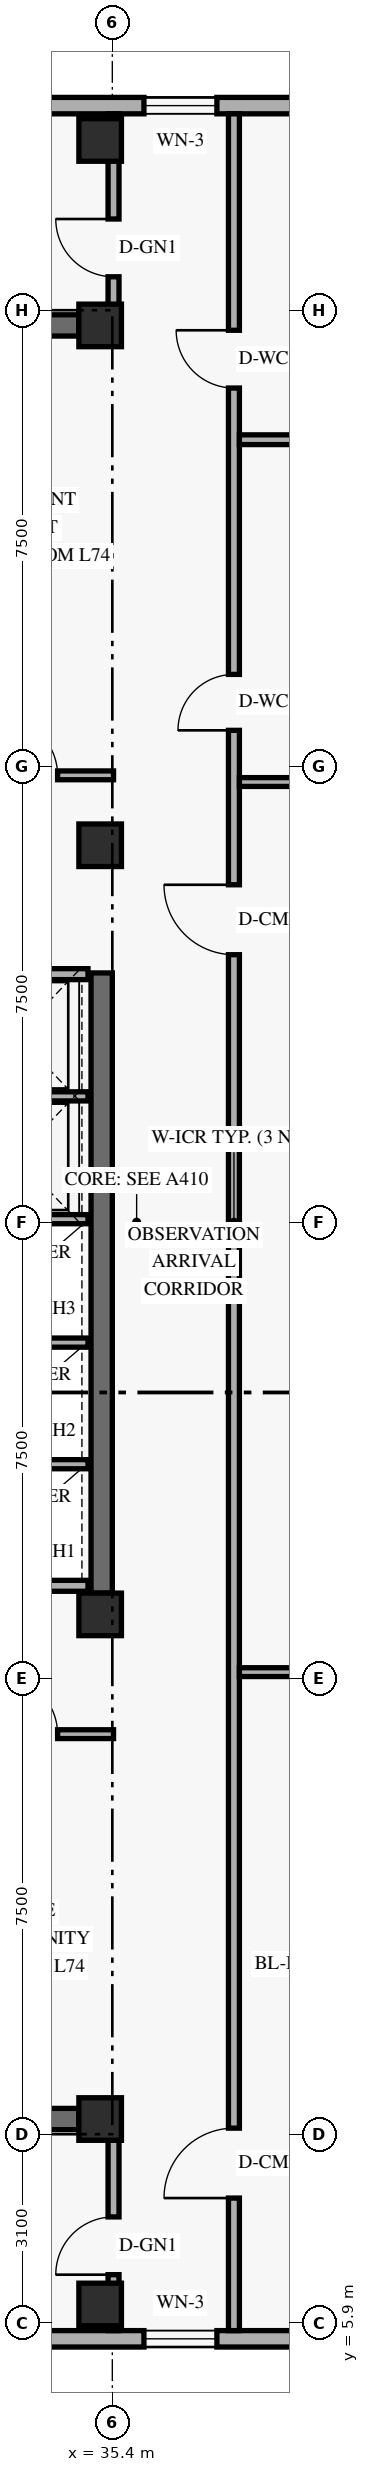
"""IFC4 building model, lengths in metres.
Left out: names, types, materials, properties, quantities, classifications, styles, units other than length and angle.
Written with IfcOpenShell. Run it as: python <this file> out.ifc"""

import sys

from ifc_helpers import new_model, si_unit, direction, frame, frame_2d, origin, origin_2d, place, context, subcontext, project, spatial, rectangle, extrude, element, fill, save


model = new_model("IFC4")
c1 = context("Model", 3, precision=1e-05, world=origin(), true_north=direction((0.0, 1.0)))
c2 = subcontext(c1, "Body", "Model", "MODEL_VIEW")
j1 = project(units=[si_unit("LENGTHUNIT", "METRE"), si_unit("PLANEANGLEUNIT", "RADIAN")], contexts=[c1])
p1 = place(None, origin())
s1 = spatial("IfcSite", under=j1, at=p1, CompositionType="ELEMENT")
p2 = place(p1, origin())
s2 = spatial("IfcBuilding", under=s1, at=p2, CompositionType="ELEMENT")
p3 = place(p2, frame((0.0, 0.0, 282.0)))
s3 = spatial("IfcBuildingStorey", under=s2, at=p3, CompositionType="ELEMENT", Elevation=282.0)
p4 = place(p3, frame((35.225, 17.9, 0.0), z_axis=(0.0, 0.0, 1.0), x_axis=(0.0, 1.0, 0.0)))
e1 = element("IfcWall", 1, at=p4, inside=s3, PredefinedType="SHEAR", context=c2, shape_type="SweptSolid", body=[
    extrude(rectangle(XDim=10.2, YDim=0.35, at=frame_2d((5.1, 0.0))), origin(), (0.0, 0.0, 1.0), 4.161),
])
for number, where, z_axis, x_axis in (
    (2, (24.55, 9.25, 0.0), (0.0, 0.0, 1.0), (1.0, 0.0, 0.0)),
    (3, (24.55, 38.75, 0.0), (0.0, 0.0, 1.0), (1.0, 0.0, 0.0)),
):
    element("IfcWall", number, at=place(p3, frame(where, z_axis=z_axis, x_axis=x_axis)), inside=s3, PredefinedType="SHEAR", context=c2, shape_type="SweptSolid", body=[
        extrude(rectangle(XDim=10.3, YDim=0.35, at=frame_2d((5.15, 0.0))), origin(), (0.0, 0.0, 1.0), 4.7),
    ])
for number, where, z_axis, x_axis in (
    (4, (35.2, 6.2, 0.0), (0.0, 0.0, 1.0), (1.0, 0.0, 0.0)),
    (5, (35.2, 9.25, 0.0), (0.0, 0.0, 1.0), (1.0, 0.0, 0.0)),
    (6, (35.2, 17.55, 0.0), (0.0, 0.0, 1.0), (1.0, 0.0, 0.0)),
    (7, (35.2, 30.2, 0.0), (0.0, 0.0, 1.0), (1.0, 0.0, 0.0)),
    (8, (35.2, 38.75, 0.0), (0.0, 0.0, 1.0), (1.0, 0.0, 0.0)),
    (9, (35.2, 41.8, 0.0), (0.0, 0.0, 1.0), (1.0, 0.0, 0.0)),
):
    element("IfcColumn", number, at=place(p3, frame(where, z_axis=z_axis, x_axis=x_axis)), inside=s3, PredefinedType="COLUMN", context=c2, shape_type="SweptSolid", body=[
        extrude(rectangle(XDim=0.7, YDim=0.7, at=origin_2d()), origin(), (0.0, 0.0, 1.0), 5.0),
    ])
p5 = place(p3, frame((25.82, 5.635, 0.0), z_axis=(0.0, 0.0, 1.0), x_axis=(1.0, 0.0, 0.0)))
e10 = element("IfcWall", 10, at=p5, inside=s3, PredefinedType="SOLIDWALL", context=c2, shape_type="SweptSolid", body=[
    extrude(rectangle(XDim=32.96, YDim=0.27, at=frame_2d((16.48, 0.0))), origin(), (0.0, 0.0, 1.0), 4.7),
])
p6 = place(p5, frame((3.27, 0.0, 0.85)))
e11 = element("IfcOpeningElement", 11, at=p6, cuts=e10, PredefinedType="OPENING", context=c2, shape_type="SweptSolid", body=[
    extrude(rectangle(XDim=2.4, YDim=1.9, at=frame_2d((1.2, 0.95))), frame((0.0, 0.145, 0.0), z_axis=(0.0, -1.0, 0.0), x_axis=(1.0, 0.0, 0.0)), (0.0, 0.0, 1.0), 0.29),
])
p7 = place(p5, frame((10.1, 0.0, 0.85)))
e12 = element("IfcOpeningElement", 12, at=p7, cuts=e10, PredefinedType="OPENING", context=c2, shape_type="SweptSolid", body=[
    extrude(rectangle(XDim=1.2, YDim=1.5, at=frame_2d((0.6, 0.75))), frame((0.0, 0.145, 0.0), z_axis=(0.0, -1.0, 0.0), x_axis=(1.0, 0.0, 0.0)), (0.0, 0.0, 1.0), 0.29),
])
p8 = place(p5, frame((16.407, 0.0, 0.85)))
e13 = element("IfcOpeningElement", 13, at=p8, cuts=e10, PredefinedType="OPENING", context=c2, shape_type="SweptSolid", body=[
    extrude(rectangle(XDim=2.4, YDim=1.9, at=frame_2d((1.2, 0.95))), frame((0.0, 0.145, 0.0), z_axis=(0.0, -1.0, 0.0), x_axis=(1.0, 0.0, 0.0)), (0.0, 0.0, 1.0), 0.29),
])
p9 = place(p3, frame((58.78, 42.365, 0.0), z_axis=(0.0, 0.0, 1.0), x_axis=(-1.0, 0.0, 0.0)))
e14 = element("IfcWall", 14, at=p9, inside=s3, PredefinedType="SOLIDWALL", context=c2, shape_type="SweptSolid", body=[
    extrude(rectangle(XDim=32.96, YDim=0.27, at=frame_2d((16.48, 0.0))), origin(), (0.0, 0.0, 1.0), 4.7),
])
p10 = place(p9, frame((27.29, 0.0, 0.85)))
e15 = element("IfcOpeningElement", 15, at=p10, cuts=e14, PredefinedType="OPENING", context=c2, shape_type="SweptSolid", body=[
    extrude(rectangle(XDim=2.4, YDim=1.9, at=frame_2d((1.2, 0.95))), frame((0.0, 0.145, 0.0), z_axis=(0.0, -1.0, 0.0), x_axis=(1.0, 0.0, 0.0)), (0.0, 0.0, 1.0), 0.29),
])
p11 = place(p9, frame((21.66, 0.0, 0.85)))
e16 = element("IfcOpeningElement", 16, at=p11, cuts=e14, PredefinedType="OPENING", context=c2, shape_type="SweptSolid", body=[
    extrude(rectangle(XDim=1.2, YDim=1.5, at=frame_2d((0.6, 0.75))), frame((0.0, 0.145, 0.0), z_axis=(0.0, -1.0, 0.0), x_axis=(1.0, 0.0, 0.0)), (0.0, 0.0, 1.0), 0.29),
])
p12 = place(p9, frame((17.13, 0.0, 0.85)))
e17 = element("IfcOpeningElement", 17, at=p12, cuts=e14, PredefinedType="OPENING", context=c2, shape_type="SweptSolid", body=[
    extrude(rectangle(XDim=2.4, YDim=1.9, at=frame_2d((1.2, 0.95))), frame((0.0, 0.145, 0.0), z_axis=(0.0, -1.0, 0.0), x_axis=(1.0, 0.0, 0.0)), (0.0, 0.0, 1.0), 0.29),
])
p13 = place(p9, frame((3.054, 0.0, 0.85)))
e18 = element("IfcOpeningElement", 18, at=p13, cuts=e14, PredefinedType="OPENING", context=c2, shape_type="SweptSolid", body=[
    extrude(rectangle(XDim=2.4, YDim=1.9, at=frame_2d((1.2, 0.95))), frame((0.0, 0.145, 0.0), z_axis=(0.0, -1.0, 0.0), x_axis=(1.0, 0.0, 0.0)), (0.0, 0.0, 1.0), 0.29),
])
for number, where, z_axis, x_axis in (
    (19, (32.74, 18.02, 0.0), (0.0, 0.0, 1.0), (1.0, 0.0, 0.0)),
    (20, (32.74, 28.08, 0.0), (0.0, 0.0, 1.0), (1.0, 0.0, 0.0)),
):
    element("IfcWall", number, at=place(p3, frame(where, z_axis=z_axis, x_axis=x_axis)), inside=s3, PredefinedType="STANDARD", context=c2, shape_type="SweptSolid", body=[
        extrude(rectangle(XDim=2.26, YDim=0.18, at=frame_2d((1.13, 0.0))), origin(), (0.0, 0.0, 1.0), 4.7),
    ])
for number, where, z_axis, x_axis in (
    (21, (32.74, 20.02, 0.0), (0.0, 0.0, 1.0), (1.0, 0.0, 0.0)),
    (22, (32.74, 22.02, 0.0), (0.0, 0.0, 1.0), (1.0, 0.0, 0.0)),
    (23, (32.74, 24.05, 0.0), (0.0, 0.0, 1.0), (1.0, 0.0, 0.0)),
    (24, (32.74, 26.07, 0.0), (0.0, 0.0, 1.0), (1.0, 0.0, 0.0)),
):
    element("IfcWall", number, at=place(p3, frame(where, z_axis=z_axis, x_axis=x_axis)), inside=s3, PredefinedType="STANDARD", context=c2, shape_type="SweptSolid", body=[
        extrude(rectangle(XDim=2.26, YDim=0.15, at=frame_2d((1.13, 0.0))), origin(), (0.0, 0.0, 1.0), 4.7),
    ])
p14 = place(p3, frame((37.4, 5.77, 0.0), z_axis=(0.0, 0.0, 1.0), x_axis=(0.0, 1.0, 0.0)))
e25 = element("IfcWall", 25, at=p14, inside=s3, PredefinedType="STANDARD", context=c2, shape_type="SweptSolid", body=[
    extrude(rectangle(XDim=36.46, YDim=0.18, at=frame_2d((18.23, 0.0))), origin(), (0.0, 0.0, 1.0), 4.143),
])
p15 = place(p14, frame((26.32, 0.0, 0.0)))
e26 = element("IfcOpeningElement", 26, at=p15, cuts=e25, PredefinedType="OPENING", context=c2, shape_type="SweptSolid", body=[
    extrude(rectangle(XDim=0.92, YDim=2.14, at=frame_2d((0.46, 1.07))), frame((0.0, 0.1, 0.0), z_axis=(0.0, -1.0, 0.0), x_axis=(1.0, 0.0, 0.0)), (0.0, 0.0, 1.0), 0.2),
])
p16 = place(p14, frame((31.95, 0.0, 0.0)))
e27 = element("IfcOpeningElement", 27, at=p16, cuts=e25, PredefinedType="OPENING", context=c2, shape_type="SweptSolid", body=[
    extrude(rectangle(XDim=0.95, YDim=2.14, at=frame_2d((0.475, 1.07))), frame((0.0, 0.1, 0.0), z_axis=(0.0, -1.0, 0.0), x_axis=(1.0, 0.0, 0.0)), (0.0, 0.0, 1.0), 0.2),
])
p17 = place(p14, frame((2.18, 0.0, 0.0)))
e28 = element("IfcOpeningElement", 28, at=p17, cuts=e25, PredefinedType="OPENING", context=c2, shape_type="SweptSolid", body=[
    extrude(rectangle(XDim=1.15, YDim=2.15, at=frame_2d((0.575, 1.075))), frame((0.0, 0.1, 0.0), z_axis=(0.0, -1.0, 0.0), x_axis=(1.0, 0.0, 0.0)), (0.0, 0.0, 1.0), 0.2),
])
p18 = place(p14, frame((22.63, 0.0, 0.0)))
e29 = element("IfcOpeningElement", 29, at=p18, cuts=e25, PredefinedType="OPENING", context=c2, shape_type="SweptSolid", body=[
    extrude(rectangle(XDim=1.15, YDim=2.15, at=frame_2d((0.575, 1.075))), frame((0.0, 0.1, 0.0), z_axis=(0.0, -1.0, 0.0), x_axis=(1.0, 0.0, 0.0)), (0.0, 0.0, 1.0), 0.2),
])
p19 = place(p3, frame((35.42, 5.77, 0.0), z_axis=(0.0, 0.0, 1.0), x_axis=(0.0, 1.0, 0.0)))
e30 = element("IfcWall", 30, at=p19, inside=s3, PredefinedType="STANDARD", context=c2, shape_type="SweptSolid", body=[
    extrude(rectangle(XDim=3.48, YDim=0.18, at=frame_2d((1.74, 0.0))), origin(), (0.0, 0.0, 1.0), 4.143),
])
p20 = place(p19, frame((0.92, 0.0, 0.0)))
e31 = element("IfcOpeningElement", 31, at=p20, cuts=e30, PredefinedType="OPENING", context=c2, shape_type="SweptSolid", body=[
    extrude(rectangle(XDim=0.95, YDim=2.15, at=frame_2d((0.475, 1.075))), frame((0.0, 0.1, 0.0), z_axis=(0.0, -1.0, 0.0), x_axis=(1.0, 0.0, 0.0)), (0.0, 0.0, 1.0), 0.2),
])
p21 = place(p3, frame((35.42, 38.75, 0.0), z_axis=(0.0, 0.0, 1.0), x_axis=(0.0, 1.0, 0.0)))
e32 = element("IfcWall", 32, at=p21, inside=s3, PredefinedType="STANDARD", context=c2, shape_type="SweptSolid", body=[
    extrude(rectangle(XDim=3.48, YDim=0.18, at=frame_2d((1.74, 0.0))), origin(), (0.0, 0.0, 1.0), 4.143),
])
p22 = place(p21, frame((0.8, 0.0, 0.0)))
e33 = element("IfcOpeningElement", 33, at=p22, cuts=e32, PredefinedType="OPENING", context=c2, shape_type="SweptSolid", body=[
    extrude(rectangle(XDim=0.95, YDim=2.15, at=frame_2d((0.475, 1.075))), frame((0.0, 0.1, 0.0), z_axis=(0.0, -1.0, 0.0), x_axis=(1.0, 0.0, 0.0)), (0.0, 0.0, 1.0), 0.2),
])
for number, where, z_axis, x_axis in (
    (34, (37.49, 16.6, 0.0), (0.0, 0.0, 1.0), (1.0, 0.0, 0.0)),
    (35, (37.49, 31.24, 0.0), (0.0, 0.0, 1.0), (1.0, 0.0, 0.0)),
):
    element("IfcWall", number, at=place(p3, frame(where, z_axis=z_axis, x_axis=x_axis)), inside=s3, PredefinedType="PARTITIONING", context=c2, shape_type="SweptSolid", body=[
        extrude(rectangle(XDim=22.04, YDim=0.145, at=frame_2d((11.02, 0.0))), origin(), (0.0, 0.0, 1.0), 4.143),
    ])
p23 = place(p3, frame((37.49, 36.87, 0.0), z_axis=(0.0, 0.0, 1.0), x_axis=(1.0, 0.0, 0.0)))
e36 = element("IfcWall", 36, at=p23, inside=s3, PredefinedType="PLUMBINGWALL", context=c2, shape_type="SweptSolid", body=[
    extrude(rectangle(XDim=5.93, YDim=0.16, at=frame_2d((2.965, 0.0))), origin(), (0.0, 0.0, 1.0), 4.7),
])
p24 = place(p3, frame((32.722, 15.58, 0.0), z_axis=(0.0, 0.0, 1.0), x_axis=(1.0, 0.0, 0.0)))
e37 = element("IfcWall", 37, at=p24, inside=s3, PredefinedType="PARTITIONING", context=c2, shape_type="SweptSolid", body=[
    extrude(rectangle(XDim=2.698, YDim=0.145, at=frame_2d((1.349, 0.0))), origin(), (0.0, 0.0, 1.0), 4.143),
])
p25 = place(p24, frame((0.827, 0.0, 0.0)))
e38 = element("IfcOpeningElement", 38, at=p25, cuts=e37, PredefinedType="OPENING", context=c2, shape_type="SweptSolid", body=[
    extrude(rectangle(XDim=0.95, YDim=2.15, at=frame_2d((0.475, 1.075))), frame((0.0, 0.083, 0.0), z_axis=(0.0, -1.0, 0.0), x_axis=(1.0, 0.0, 0.0)), (0.0, 0.0, 1.0), 0.165),
])
p26 = place(p3, frame((32.722, 31.35, 0.0), z_axis=(0.0, 0.0, 1.0), x_axis=(1.0, 0.0, 0.0)))
e39 = element("IfcWall", 39, at=p26, inside=s3, PredefinedType="PARTITIONING", context=c2, shape_type="SweptSolid", body=[
    extrude(rectangle(XDim=2.698, YDim=0.145, at=frame_2d((1.349, 0.0))), origin(), (0.0, 0.0, 1.0), 4.143),
])
p27 = place(p26, frame((0.827, 0.0, 0.0)))
e40 = element("IfcOpeningElement", 40, at=p27, cuts=e39, PredefinedType="OPENING", context=c2, shape_type="SweptSolid", body=[
    extrude(rectangle(XDim=0.95, YDim=2.15, at=frame_2d((0.475, 1.075))), frame((0.0, 0.083, 0.0), z_axis=(0.0, -1.0, 0.0), x_axis=(1.0, 0.0, 0.0)), (0.0, 0.0, 1.0), 0.165),
])
p28 = place(p7, origin())
e41 = element("IfcWindow", 41, at=p28, inside=s3, PartitioningType="SINGLE_PANEL", PredefinedType="WINDOW", context=c2, shape_type="SweptSolid", body=[
    extrude(rectangle(XDim=1.2, YDim=1.5, at=frame_2d((0.6, 0.75))), frame((0.0, 0.03, 0.0), z_axis=(0.0, -1.0, 0.0), x_axis=(1.0, 0.0, 0.0)), (0.0, 0.0, 1.0), 0.06),
])
fill(e12, e41)
p29 = place(p11, origin())
e42 = element("IfcWindow", 42, at=p29, inside=s3, PartitioningType="SINGLE_PANEL", PredefinedType="WINDOW", context=c2, shape_type="SweptSolid", body=[
    extrude(rectangle(XDim=1.2, YDim=1.5, at=frame_2d((0.6, 0.75))), frame((0.0, 0.03, 0.0), z_axis=(0.0, -1.0, 0.0), x_axis=(1.0, 0.0, 0.0)), (0.0, 0.0, 1.0), 0.06),
])
fill(e16, e42)
p30 = place(p15, origin())
e43 = element("IfcDoor", 43, at=p30, inside=s3, OperationType="SINGLE_SWING_LEFT", PredefinedType="DOOR", context=c2, shape_type="SweptSolid", body=[
    extrude(rectangle(XDim=0.92, YDim=2.14, at=frame_2d((0.46, 1.07))), frame((0.0, 0.025, 0.0), z_axis=(0.0, -1.0, 0.0), x_axis=(1.0, 0.0, 0.0)), (0.0, 0.0, 1.0), 0.05),
])
fill(e26, e43)
p31 = place(p16, origin())
e44 = element("IfcDoor", 44, at=p31, inside=s3, OperationType="SINGLE_SWING_RIGHT", PredefinedType="DOOR", context=c2, shape_type="SweptSolid", body=[
    extrude(rectangle(XDim=0.95, YDim=2.14, at=frame_2d((0.475, 1.07))), frame((0.0, 0.025, 0.0), z_axis=(0.0, -1.0, 0.0), x_axis=(1.0, 0.0, 0.0)), (0.0, 0.0, 1.0), 0.05),
])
fill(e27, e44)
p32 = place(p25, origin())
e45 = element("IfcDoor", 45, at=p32, inside=s3, OperationType="SINGLE_SWING_LEFT", PredefinedType="DOOR", context=c2, shape_type="SweptSolid", body=[
    extrude(rectangle(XDim=0.95, YDim=2.15, at=frame_2d((0.475, 1.075))), frame((0.0, 0.025, 0.0), z_axis=(0.0, -1.0, 0.0), x_axis=(1.0, 0.0, 0.0)), (0.0, 0.0, 1.0), 0.05),
])
fill(e38, e45)
p33 = place(p27, origin())
e46 = element("IfcDoor", 46, at=p33, inside=s3, OperationType="SINGLE_SWING_LEFT", PredefinedType="DOOR", context=c2, shape_type="SweptSolid", body=[
    extrude(rectangle(XDim=0.95, YDim=2.15, at=frame_2d((0.475, 1.075))), frame((0.0, 0.025, 0.0), z_axis=(0.0, -1.0, 0.0), x_axis=(1.0, 0.0, 0.0)), (0.0, 0.0, 1.0), 0.05),
])
fill(e40, e46)
p34 = place(p17, origin())
e47 = element("IfcDoor", 47, at=p34, inside=s3, OperationType="SINGLE_SWING_LEFT", PredefinedType="DOOR", context=c2, shape_type="SweptSolid", body=[
    extrude(rectangle(XDim=1.15, YDim=2.15, at=frame_2d((0.575, 1.075))), frame((0.0, 0.025, 0.0), z_axis=(0.0, -1.0, 0.0), x_axis=(1.0, 0.0, 0.0)), (0.0, 0.0, 1.0), 0.05),
])
fill(e28, e47)
p35 = place(p18, origin())
e48 = element("IfcDoor", 48, at=p35, inside=s3, OperationType="SINGLE_SWING_RIGHT", PredefinedType="DOOR", context=c2, shape_type="SweptSolid", body=[
    extrude(rectangle(XDim=1.15, YDim=2.15, at=frame_2d((0.575, 1.075))), frame((0.0, 0.025, 0.0), z_axis=(0.0, -1.0, 0.0), x_axis=(1.0, 0.0, 0.0)), (0.0, 0.0, 1.0), 0.05),
])
fill(e29, e48)
p36 = place(p20, origin())
e49 = element("IfcDoor", 49, at=p36, inside=s3, OperationType="SINGLE_SWING_LEFT", PredefinedType="DOOR", context=c2, shape_type="SweptSolid", body=[
    extrude(rectangle(XDim=0.95, YDim=2.15, at=frame_2d((0.475, 1.075))), frame((0.0, 0.025, 0.0), z_axis=(0.0, -1.0, 0.0), x_axis=(1.0, 0.0, 0.0)), (0.0, 0.0, 1.0), 0.05),
])
fill(e31, e49)
p37 = place(p22, origin())
e50 = element("IfcDoor", 50, at=p37, inside=s3, OperationType="SINGLE_SWING_RIGHT", PredefinedType="DOOR", context=c2, shape_type="SweptSolid", body=[
    extrude(rectangle(XDim=0.95, YDim=2.15, at=frame_2d((0.475, 1.075))), frame((0.0, 0.025, 0.0), z_axis=(0.0, -1.0, 0.0), x_axis=(1.0, 0.0, 0.0)), (0.0, 0.0, 1.0), 0.05),
])
fill(e33, e50)
save(model, sys.argv[1])
